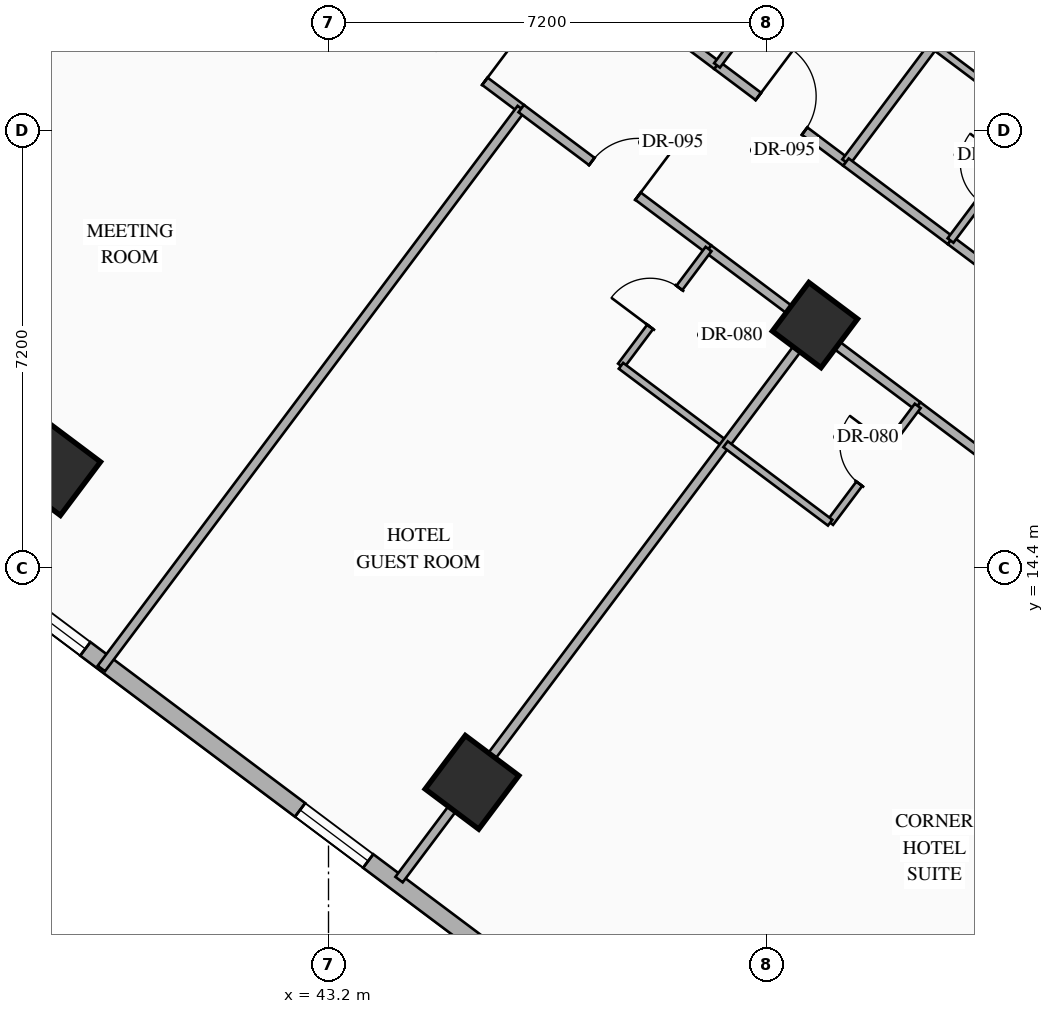
"""IFC4 building model, lengths in metres.
Left out: names, types, materials, properties, quantities, classifications, styles, units other than length and angle.
Written with IfcOpenShell. Run it as: python <this file> out.ifc"""

import sys

from ifc_helpers import new_model, si_unit, direction, frame, frame_2d, origin, origin_2d, place, context, subcontext, project, spatial, rectangle, hollow_rectangle, extrude, element, fill, save


model = new_model("IFC4")
c1 = context("Model", 3, precision=1e-05, world=origin(), true_north=direction((0.0, 1.0)))
c2 = subcontext(c1, "Body", "Model", "MODEL_VIEW")
j1 = project(units=[si_unit("LENGTHUNIT", "METRE"), si_unit("PLANEANGLEUNIT", "RADIAN")], contexts=[c1])
p1 = place(None, origin())
s1 = spatial("IfcSite", under=j1, at=p1, CompositionType="ELEMENT")
p2 = place(p1, origin())
s2 = spatial("IfcBuilding", under=s1, at=p2, CompositionType="ELEMENT")
p3 = place(p2, frame((0.0, 0.0, 43.3)))
s3 = spatial("IfcBuildingStorey", under=s2, at=p3, CompositionType="ELEMENT", Elevation=43.3)
for number, where, z_axis, x_axis in (
    (1, (38.68, 16.04, 0.0), (0.0, 0.0, 1.0), (0.8, -0.6, 0.0)),
    (2, (45.56, 10.88, 0.0), (0.0, 0.0, 1.0), (0.8, -0.6, 0.0)),
):
    element("IfcColumn", number, at=place(p3, frame(where, z_axis=z_axis, x_axis=x_axis)), inside=s3, PredefinedType="COLUMN", context=c2, shape_type="SweptSolid", body=[
        extrude(hollow_rectangle(XDim=1.1, YDim=1.1, WallThickness=0.04, at=origin_2d()), origin(), (0.0, 0.0, 1.0), 3.35),
    ])
p4 = place(p3, frame((51.2, 18.4, 0.0), z_axis=(0.0, 0.0, 1.0), x_axis=(0.799999996291, -0.600000004945, 0.0)))
e3 = element("IfcColumn", 3, at=p4, inside=s3, PredefinedType="COLUMN", context=c2, shape_type="SweptSolid", body=[
    extrude(hollow_rectangle(XDim=1.0, YDim=1.0, WallThickness=0.038, at=origin_2d()), origin(), (0.0, 0.0, 1.0), 3.35),
])
p5 = place(p3, frame((44.86, 40.73, 0.0), z_axis=(0.0, 0.0, 1.0), x_axis=(0.800006902154, -0.599990797017, 0.0)))
e4 = element("IfcWall", 4, at=p5, inside=s3, PredefinedType="STANDARD", context=c2, shape_type="SweptSolid", body=[
    extrude(rectangle(XDim=29.712, YDim=0.28, at=frame_2d((14.856, 0.0))), origin(), (0.0, 0.0, 1.0), 3.13),
])
p6 = place(p5, frame((14.249, 0.0, 0.0)))
e5 = element("IfcOpeningElement", 5, at=p6, cuts=e4, PredefinedType="OPENING", context=c2, shape_type="SweptSolid", body=[
    extrude(rectangle(XDim=1.1, YDim=2.2, at=frame_2d((0.55, 1.1))), frame((0.0, 0.15, 0.0), z_axis=(0.0, -1.0, 0.0), x_axis=(1.0, 0.0, 0.0)), (0.0, 0.0, 1.0), 0.3),
])
p7 = place(p5, frame((1.612, 0.0, 0.85)))
e6 = element("IfcOpeningElement", 6, at=p7, cuts=e4, PredefinedType="OPENING", context=c2, shape_type="SweptSolid", body=[
    extrude(rectangle(XDim=1.4, YDim=1.8, at=frame_2d((0.7, 0.9))), frame((0.0, 0.15, 0.0), z_axis=(0.0, -1.0, 0.0), x_axis=(1.0, 0.0, 0.0)), (0.0, 0.0, 1.0), 0.3),
])
p8 = place(p5, frame((5.667, 0.0, 0.85)))
e7 = element("IfcOpeningElement", 7, at=p8, cuts=e4, PredefinedType="OPENING", context=c2, shape_type="SweptSolid", body=[
    extrude(rectangle(XDim=1.4, YDim=1.8, at=frame_2d((0.7, 0.9))), frame((0.0, 0.15, 0.0), z_axis=(0.0, -1.0, 0.0), x_axis=(1.0, 0.0, 0.0)), (0.0, 0.0, 1.0), 0.3),
])
p9 = place(p5, frame((9.912, 0.0, 0.85)))
e8 = element("IfcOpeningElement", 8, at=p9, cuts=e4, PredefinedType="OPENING", context=c2, shape_type="SweptSolid", body=[
    extrude(rectangle(XDim=1.4, YDim=1.8, at=frame_2d((0.7, 0.9))), frame((0.0, 0.15, 0.0), z_axis=(0.0, -1.0, 0.0), x_axis=(1.0, 0.0, 0.0)), (0.0, 0.0, 1.0), 0.3),
])
p10 = place(p5, frame((19.528, 0.0, 0.85)))
e9 = element("IfcOpeningElement", 9, at=p10, cuts=e4, PredefinedType="OPENING", context=c2, shape_type="SweptSolid", body=[
    extrude(rectangle(XDim=1.4, YDim=1.8, at=frame_2d((0.7, 0.9))), frame((0.0, 0.15, 0.0), z_axis=(0.0, -1.0, 0.0), x_axis=(1.0, 0.0, 0.0)), (0.0, 0.0, 1.0), 0.3),
])
p11 = place(p5, frame((23.451, 0.0, 0.85)))
e10 = element("IfcOpeningElement", 10, at=p11, cuts=e4, PredefinedType="OPENING", context=c2, shape_type="SweptSolid", body=[
    extrude(rectangle(XDim=1.4, YDim=1.8, at=frame_2d((0.7, 0.9))), frame((0.0, 0.15, 0.0), z_axis=(0.0, -1.0, 0.0), x_axis=(1.0, 0.0, 0.0)), (0.0, 0.0, 1.0), 0.3),
])
p12 = place(p5, frame((27.852, 0.0, 0.85)))
e11 = element("IfcOpeningElement", 11, at=p12, cuts=e4, PredefinedType="OPENING", context=c2, shape_type="SweptSolid", body=[
    extrude(rectangle(XDim=1.4, YDim=1.8, at=frame_2d((0.7, 0.9))), frame((0.0, 0.15, 0.0), z_axis=(0.0, -1.0, 0.0), x_axis=(1.0, 0.0, 0.0)), (0.0, 0.0, 1.0), 0.3),
])
p13 = place(p3, frame((53.318, 2.487, 0.0), z_axis=(0.0, 0.0, 1.0), x_axis=(-0.800004174678, 0.599994433723, 0.0)))
e12 = element("IfcWall", 12, at=p13, inside=s3, PredefinedType="STANDARD", context=c2, shape_type="SweptSolid", body=[
    extrude(rectangle(XDim=35.089, YDim=0.28, at=frame_2d((17.544, 0.0))), origin(), (0.0, 0.0, 1.0), 3.13),
])
p14 = place(p13, frame((1.931, 0.0, 0.85)))
e13 = element("IfcOpeningElement", 13, at=p14, cuts=e12, PredefinedType="OPENING", context=c2, shape_type="SweptSolid", body=[
    extrude(rectangle(XDim=1.4, YDim=1.8, at=frame_2d((0.7, 0.9))), frame((0.0, 0.15, 0.0), z_axis=(0.0, -1.0, 0.0), x_axis=(1.0, 0.0, 0.0)), (0.0, 0.0, 1.0), 0.3),
])
p15 = place(p13, frame((6.819, 0.0, 0.85)))
e14 = element("IfcOpeningElement", 14, at=p15, cuts=e12, PredefinedType="OPENING", context=c2, shape_type="SweptSolid", body=[
    extrude(rectangle(XDim=1.4, YDim=1.8, at=frame_2d((0.7, 0.9))), frame((0.0, 0.15, 0.0), z_axis=(0.0, -1.0, 0.0), x_axis=(1.0, 0.0, 0.0)), (0.0, 0.0, 1.0), 0.3),
])
p16 = place(p13, frame((11.832, 0.0, 0.85)))
e15 = element("IfcOpeningElement", 15, at=p16, cuts=e12, PredefinedType="OPENING", context=c2, shape_type="SweptSolid", body=[
    extrude(rectangle(XDim=1.4, YDim=1.8, at=frame_2d((0.7, 0.9))), frame((0.0, 0.15, 0.0), z_axis=(0.0, -1.0, 0.0), x_axis=(1.0, 0.0, 0.0)), (0.0, 0.0, 1.0), 0.3),
])
p17 = place(p13, frame((17.647, 0.0, 0.85)))
e16 = element("IfcOpeningElement", 16, at=p17, cuts=e12, PredefinedType="OPENING", context=c2, shape_type="SweptSolid", body=[
    extrude(rectangle(XDim=1.4, YDim=1.8, at=frame_2d((0.7, 0.9))), frame((0.0, 0.15, 0.0), z_axis=(0.0, -1.0, 0.0), x_axis=(1.0, 0.0, 0.0)), (0.0, 0.0, 1.0), 0.3),
])
p18 = place(p13, frame((21.857, 0.0, 0.85)))
e17 = element("IfcOpeningElement", 17, at=p18, cuts=e12, PredefinedType="OPENING", context=c2, shape_type="SweptSolid", body=[
    extrude(rectangle(XDim=1.4, YDim=1.8, at=frame_2d((0.7, 0.9))), frame((0.0, 0.15, 0.0), z_axis=(0.0, -1.0, 0.0), x_axis=(1.0, 0.0, 0.0)), (0.0, 0.0, 1.0), 0.3),
])
p19 = place(p13, frame((26.87, 0.0, 0.85)))
e18 = element("IfcOpeningElement", 18, at=p19, cuts=e12, PredefinedType="OPENING", context=c2, shape_type="SweptSolid", body=[
    extrude(rectangle(XDim=1.4, YDim=1.8, at=frame_2d((0.7, 0.9))), frame((0.0, 0.15, 0.0), z_axis=(0.0, -1.0, 0.0), x_axis=(1.0, 0.0, 0.0)), (0.0, 0.0, 1.0), 0.3),
])
p20 = place(p13, frame((31.757, 0.0, 0.85)))
e19 = element("IfcOpeningElement", 19, at=p20, cuts=e12, PredefinedType="OPENING", context=c2, shape_type="SweptSolid", body=[
    extrude(rectangle(XDim=1.4, YDim=1.8, at=frame_2d((0.7, 0.9))), frame((0.0, 0.15, 0.0), z_axis=(0.0, -1.0, 0.0), x_axis=(1.0, 0.0, 0.0)), (0.0, 0.0, 1.0), 0.3),
])
p21 = place(p3, frame((43.037, 24.46, 0.0), z_axis=(0.0, 0.0, 1.0), x_axis=(0.799971872363, -0.600037501685, 0.0)))
e20 = element("IfcWall", 20, at=p21, inside=s3, PredefinedType="PARTITIONING", context=c2, shape_type="SweptSolid", body=[
    extrude(rectangle(XDim=4.167, YDim=0.15, at=frame_2d((2.083, 0.0))), origin(), (0.0, 0.0, 1.0), 2.425),
])
p22 = place(p21, frame((2.468, 0.0, 0.0)))
e21 = element("IfcOpeningElement", 21, at=p22, cuts=e20, PredefinedType="OPENING", context=c2, shape_type="SweptSolid", body=[
    extrude(rectangle(XDim=0.95, YDim=2.15, at=frame_2d((0.475, 1.075))), frame((0.0, 0.085, 0.0), z_axis=(0.0, -1.0, 0.0), x_axis=(1.0, 0.0, 0.0)), (0.0, 0.0, 1.0), 0.17),
])
p23 = place(p3, frame((33.384, 17.312, 0.0), z_axis=(0.0, 0.0, 1.0), x_axis=(0.600008743659, 0.799993442181, 0.0)))
e22 = element("IfcWall", 22, at=p23, inside=s3, PredefinedType="PARTITIONING", context=c2, shape_type="SweptSolid", body=[
    extrude(rectangle(XDim=8.935, YDim=0.15, at=frame_2d((4.468, 0.0))), origin(), (0.0, 0.0, 1.0), 3.13),
])
p24 = place(p3, frame((39.464, 12.752, 0.0), z_axis=(0.0, 0.0, 1.0), x_axis=(0.6, 0.8, 0.0)))
e23 = element("IfcWall", 23, at=p24, inside=s3, PredefinedType="PARTITIONING", context=c2, shape_type="SweptSolid", body=[
    extrude(rectangle(XDim=11.51, YDim=0.15, at=frame_2d((5.755, 0.0))), origin(), (0.0, 0.0, 1.0), 3.13),
])
p25 = place(p3, frame((47.87, 23.96, 0.0), z_axis=(0.0, 0.0, 1.0), x_axis=(0.79998637334, -0.60001816845, 0.0)))
e24 = element("IfcWall", 24, at=p25, inside=s3, PredefinedType="PARTITIONING", context=c2, shape_type="SweptSolid", body=[
    extrude(rectangle(XDim=2.15, YDim=0.15, at=frame_2d((1.075, 0.0))), origin(), (0.0, 0.0, 1.0), 2.775),
])
p26 = place(p3, frame((49.59, 22.67, 0.0), z_axis=(0.0, 0.0, 1.0), x_axis=(0.800011056104, -0.599985258246, 0.0)))
e25 = element("IfcWall", 25, at=p26, inside=s3, PredefinedType="PARTITIONING", context=c2, shape_type="SweptSolid", body=[
    extrude(rectangle(XDim=2.65, YDim=0.15, at=frame_2d((1.325, 0.0))), origin(), (0.0, 0.0, 1.0), 2.775),
])
p27 = place(p26, frame((0.85, 0.0, 0.0)))
e26 = element("IfcOpeningElement", 26, at=p27, cuts=e25, PredefinedType="OPENING", context=c2, shape_type="SweptSolid", body=[
    extrude(rectangle(XDim=0.95, YDim=2.15, at=frame_2d((0.475, 1.075))), frame((0.0, 0.085, 0.0), z_axis=(0.0, -1.0, 0.0), x_axis=(1.0, 0.0, 0.0)), (0.0, 0.0, 1.0), 0.17),
])
p28 = place(p3, frame((49.59, 22.67, 0.0), z_axis=(0.0, 0.0, 1.0), x_axis=(0.599951172744, 0.800036618114, 0.0)))
e27 = element("IfcWall", 27, at=p28, inside=s3, PredefinedType="PARTITIONING", context=c2, shape_type="SweptSolid", body=[
    extrude(rectangle(XDim=2.4, YDim=0.12, at=frame_2d((1.2, 0.0))), origin(), (0.0, 0.0, 1.0), 3.13),
])
p29 = place(p28, frame((0.8, 0.0, 0.0)))
e28 = element("IfcOpeningElement", 28, at=p29, cuts=e27, PredefinedType="OPENING", context=c2, shape_type="SweptSolid", body=[
    extrude(rectangle(XDim=0.8, YDim=2.06, at=frame_2d((0.4, 1.03))), frame((0.0, 0.07, 0.0), z_axis=(0.0, -1.0, 0.0), x_axis=(1.0, 0.0, 0.0)), (0.0, 0.0, 1.0), 0.14),
])
p30 = place(p3, frame((51.71, 21.08, 0.0), z_axis=(0.0, 0.0, 1.0), x_axis=(0.599996617946, 0.80000253653, 0.0)))
e29 = element("IfcWall", 29, at=p30, inside=s3, PredefinedType="PARTITIONING", context=c2, shape_type="SweptSolid", body=[
    extrude(rectangle(XDim=11.55, YDim=0.15, at=frame_2d((5.775, 0.0))), origin(), (0.0, 0.0, 1.0), 3.13),
])
p31 = place(p3, frame((51.71, 21.08, 0.0), z_axis=(0.0, 0.0, 1.0), x_axis=(0.79998637334, -0.60001816845, 0.0)))
e30 = element("IfcWall", 30, at=p31, inside=s3, PredefinedType="PARTITIONING", context=c2, shape_type="SweptSolid", body=[
    extrude(rectangle(XDim=2.15, YDim=0.15, at=frame_2d((1.075, 0.0))), origin(), (0.0, 0.0, 1.0), 2.775),
])
p32 = place(p3, frame((53.43, 19.79, 0.0), z_axis=(0.0, 0.0, 1.0), x_axis=(0.8, -0.6, 0.0)))
e31 = element("IfcWall", 31, at=p32, inside=s3, PredefinedType="PARTITIONING", context=c2, shape_type="SweptSolid", body=[
    extrude(rectangle(XDim=2.65, YDim=0.15, at=frame_2d((1.325, 0.0))), origin(), (0.0, 0.0, 1.0), 2.775),
])
p33 = place(p32, frame((0.85, 0.0, 0.0)))
e32 = element("IfcOpeningElement", 32, at=p33, cuts=e31, PredefinedType="OPENING", context=c2, shape_type="SweptSolid", body=[
    extrude(rectangle(XDim=0.95, YDim=2.15, at=frame_2d((0.475, 1.075))), frame((0.0, 0.085, 0.0), z_axis=(0.0, -1.0, 0.0), x_axis=(1.0, 0.0, 0.0)), (0.0, 0.0, 1.0), 0.17),
])
p34 = place(p3, frame((53.43, 19.79, 0.0), z_axis=(0.0, 0.0, 1.0), x_axis=(0.600065100855, 0.79995117022, 0.0)))
e33 = element("IfcWall", 33, at=p34, inside=s3, PredefinedType="PARTITIONING", context=c2, shape_type="SweptSolid", body=[
    extrude(rectangle(XDim=2.4, YDim=0.12, at=frame_2d((1.2, 0.0))), origin(), (0.0, 0.0, 1.0), 3.13),
])
p35 = place(p34, frame((0.8, 0.0, 0.0)))
e34 = element("IfcOpeningElement", 34, at=p35, cuts=e33, PredefinedType="OPENING", context=c2, shape_type="SweptSolid", body=[
    extrude(rectangle(XDim=0.8, YDim=2.06, at=frame_2d((0.4, 1.03))), frame((0.0, 0.07, 0.0), z_axis=(0.0, -1.0, 0.0), x_axis=(1.0, 0.0, 0.0)), (0.0, 0.0, 1.0), 0.14),
])
p36 = place(p3, frame((53.15, 23.0, 0.0), z_axis=(0.0, 0.0, 1.0), x_axis=(0.800027249606, -0.599963665473, 0.0)))
e35 = element("IfcWall", 35, at=p36, inside=s3, PredefinedType="PARTITIONING", context=c2, shape_type="SweptSolid", body=[
    extrude(rectangle(XDim=2.15, YDim=0.12, at=frame_2d((1.075, 0.0))), origin(), (0.0, 0.0, 1.0), 3.13),
])
p37 = place(p3, frame((46.37, 21.96, 0.0), z_axis=(0.0, 0.0, 1.0), x_axis=(0.799977170108, -0.600030438649, 0.0)))
e36 = element("IfcWall", 36, at=p37, inside=s3, PredefinedType="PARTITIONING", context=c2, shape_type="SweptSolid", body=[
    extrude(rectangle(XDim=3.85, YDim=0.15, at=frame_2d((1.925, 0.0))), origin(), (0.0, 0.0, 1.0), 2.425),
])
p38 = place(p37, frame((1.45, 0.0, 0.0)))
e37 = element("IfcOpeningElement", 37, at=p38, cuts=e36, PredefinedType="OPENING", context=c2, shape_type="SweptSolid", body=[
    extrude(rectangle(XDim=0.95, YDim=2.15, at=frame_2d((0.475, 1.075))), frame((0.0, 0.085, 0.0), z_axis=(0.0, -1.0, 0.0), x_axis=(1.0, 0.0, 0.0)), (0.0, 0.0, 1.0), 0.17),
])
p39 = place(p3, frame((49.45, 19.65, 0.0), z_axis=(0.0, 0.0, 1.0), x_axis=(0.800040880289, -0.59994548908, 0.0)))
e38 = element("IfcWall", 38, at=p39, inside=s3, PredefinedType="PARTITIONING", context=c2, shape_type="SweptSolid", body=[
    extrude(rectangle(XDim=2.15, YDim=0.15, at=frame_2d((1.075, 0.0))), origin(), (0.0, 0.0, 1.0), 2.425),
])
p40 = place(p3, frame((48.01, 17.73, 0.0), z_axis=(0.0, 0.0, 1.0), x_axis=(0.6, 0.8, 0.0)))
e39 = element("IfcWall", 39, at=p40, inside=s3, PredefinedType="PARTITIONING", context=c2, shape_type="SweptSolid", body=[
    extrude(rectangle(XDim=2.4, YDim=0.12, at=frame_2d((1.2, 0.0))), origin(), (0.0, 0.0, 1.0), 3.13),
])
p41 = place(p40, frame((0.8, 0.0, 0.0)))
e40 = element("IfcOpeningElement", 40, at=p41, cuts=e39, PredefinedType="OPENING", context=c2, shape_type="SweptSolid", body=[
    extrude(rectangle(XDim=0.8, YDim=2.06, at=frame_2d((0.4, 1.03))), frame((0.0, 0.07, 0.0), z_axis=(0.0, -1.0, 0.0), x_axis=(1.0, 0.0, 0.0)), (0.0, 0.0, 1.0), 0.14),
])
p42 = place(p3, frame((48.01, 17.73, 0.0), z_axis=(0.0, 0.0, 1.0), x_axis=(0.79998637334, -0.60001816845, 0.0)))
e41 = element("IfcWall", 41, at=p42, inside=s3, PredefinedType="PARTITIONING", context=c2, shape_type="SweptSolid", body=[
    extrude(rectangle(XDim=2.15, YDim=0.12, at=frame_2d((1.075, 0.0))), origin(), (0.0, 0.0, 1.0), 3.13),
])
p43 = place(p3, frame((44.36, 9.28, 0.0), z_axis=(0.0, 0.0, 1.0), x_axis=(0.599986233332, 0.800010324816, 0.0)))
e42 = element("IfcWall", 42, at=p43, inside=s3, PredefinedType="PARTITIONING", context=c2, shape_type="SweptSolid", body=[
    extrude(rectangle(XDim=11.35, YDim=0.15, at=frame_2d((5.675, 0.0))), origin(), (0.0, 0.0, 1.0), 2.425),
])
p44 = place(p3, frame((51.17, 18.36, 0.0), z_axis=(0.0, 0.0, 1.0), x_axis=(0.79998637334, -0.60001816845, 0.0)))
e43 = element("IfcWall", 43, at=p44, inside=s3, PredefinedType="PARTITIONING", context=c2, shape_type="SweptSolid", body=[
    extrude(rectangle(XDim=2.15, YDim=0.15, at=frame_2d((1.075, 0.0))), origin(), (0.0, 0.0, 1.0), 2.425),
])
p45 = place(p3, frame((52.89, 17.07, 0.0), z_axis=(0.0, 0.0, 1.0), x_axis=(0.8, -0.6, 0.0)))
e44 = element("IfcWall", 44, at=p45, inside=s3, PredefinedType="PARTITIONING", context=c2, shape_type="SweptSolid", body=[
    extrude(rectangle(XDim=11.51, YDim=0.15, at=frame_2d((5.755, 0.0))), origin(), (0.0, 0.0, 1.0), 2.425),
])
p46 = place(p45, frame((5.28, 0.0, 0.0)))
e45 = element("IfcOpeningElement", 45, at=p46, cuts=e44, PredefinedType="OPENING", context=c2, shape_type="SweptSolid", body=[
    extrude(rectangle(XDim=0.95, YDim=2.15, at=frame_2d((0.475, 1.075))), frame((0.0, 0.085, 0.0), z_axis=(0.0, -1.0, 0.0), x_axis=(1.0, 0.0, 0.0)), (0.0, 0.0, 1.0), 0.17),
])
p47 = place(p3, frame((51.45, 15.15, 0.0), z_axis=(0.0, 0.0, 1.0), x_axis=(0.599951172744, 0.800036618114, 0.0)))
e46 = element("IfcWall", 46, at=p47, inside=s3, PredefinedType="PARTITIONING", context=c2, shape_type="SweptSolid", body=[
    extrude(rectangle(XDim=2.4, YDim=0.12, at=frame_2d((1.2, 0.0))), origin(), (0.0, 0.0, 1.0), 3.13),
])
p48 = place(p47, frame((0.8, 0.0, 0.0)))
e47 = element("IfcOpeningElement", 47, at=p48, cuts=e46, PredefinedType="OPENING", context=c2, shape_type="SweptSolid", body=[
    extrude(rectangle(XDim=0.8, YDim=2.06, at=frame_2d((0.4, 1.03))), frame((0.0, 0.07, 0.0), z_axis=(0.0, -1.0, 0.0), x_axis=(1.0, 0.0, 0.0)), (0.0, 0.0, 1.0), 0.14),
])
p49 = place(p3, frame((49.73, 16.44, 0.0), z_axis=(0.0, 0.0, 1.0), x_axis=(0.79998637334, -0.60001816845, 0.0)))
e48 = element("IfcWall", 48, at=p49, inside=s3, PredefinedType="PARTITIONING", context=c2, shape_type="SweptSolid", body=[
    extrude(rectangle(XDim=2.15, YDim=0.12, at=frame_2d((1.075, 0.0))), origin(), (0.0, 0.0, 1.0), 3.13),
])
p50 = place(p16, origin())
e49 = element("IfcWindow", 49, at=p50, inside=s3, PartitioningType="SINGLE_PANEL", PredefinedType="WINDOW", context=c2, shape_type="SweptSolid", body=[
    extrude(rectangle(XDim=1.4, YDim=1.8, at=frame_2d((0.7, 0.9))), frame((0.0, 0.03, 0.0), z_axis=(0.0, -1.0, 0.0), x_axis=(1.0, 0.0, 0.0)), (0.0, 0.0, 1.0), 0.06),
])
fill(e15, e49)
p51 = place(p17, origin())
e50 = element("IfcWindow", 50, at=p51, inside=s3, PartitioningType="SINGLE_PANEL", PredefinedType="WINDOW", context=c2, shape_type="SweptSolid", body=[
    extrude(rectangle(XDim=1.4, YDim=1.8, at=frame_2d((0.7, 0.9))), frame((0.0, 0.03, 0.0), z_axis=(0.0, -1.0, 0.0), x_axis=(1.0, 0.0, 0.0)), (0.0, 0.0, 1.0), 0.06),
])
fill(e16, e50)
p52 = place(p22, origin())
e51 = element("IfcDoor", 51, at=p52, inside=s3, OperationType="SINGLE_SWING_RIGHT", PredefinedType="DOOR", context=c2, shape_type="SweptSolid", body=[
    extrude(rectangle(XDim=0.95, YDim=2.15, at=frame_2d((0.475, 1.075))), frame((0.0, 0.025, 0.0), z_axis=(0.0, -1.0, 0.0), x_axis=(1.0, 0.0, 0.0)), (0.0, 0.0, 1.0), 0.05),
])
fill(e21, e51)
p53 = place(p27, origin())
e52 = element("IfcDoor", 52, at=p53, inside=s3, OperationType="SINGLE_SWING_LEFT", PredefinedType="DOOR", context=c2, shape_type="SweptSolid", body=[
    extrude(rectangle(XDim=0.95, YDim=2.15, at=frame_2d((0.475, 1.075))), frame((0.0, 0.025, 0.0), z_axis=(0.0, -1.0, 0.0), x_axis=(1.0, 0.0, 0.0)), (0.0, 0.0, 1.0), 0.05),
])
fill(e26, e52)
p54 = place(p38, origin())
e53 = element("IfcDoor", 53, at=p54, inside=s3, OperationType="SINGLE_SWING_RIGHT", PredefinedType="DOOR", context=c2, shape_type="SweptSolid", body=[
    extrude(rectangle(XDim=0.95, YDim=2.15, at=frame_2d((0.475, 1.075))), frame((0.0, 0.025, 0.0), z_axis=(0.0, -1.0, 0.0), x_axis=(1.0, 0.0, 0.0)), (0.0, 0.0, 1.0), 0.05),
])
fill(e37, e53)
p55 = place(p41, origin())
e54 = element("IfcDoor", 54, at=p55, inside=s3, OperationType="SINGLE_SWING_LEFT", PredefinedType="DOOR", context=c2, shape_type="SweptSolid", body=[
    extrude(rectangle(XDim=0.8, YDim=2.06, at=frame_2d((0.4, 1.03))), frame((0.0, 0.025, 0.0), z_axis=(0.0, -1.0, 0.0), x_axis=(1.0, 0.0, 0.0)), (0.0, 0.0, 1.0), 0.05),
])
fill(e40, e54)
p56 = place(p48, origin())
e55 = element("IfcDoor", 55, at=p56, inside=s3, OperationType="SINGLE_SWING_RIGHT", PredefinedType="DOOR", context=c2, shape_type="SweptSolid", body=[
    extrude(rectangle(XDim=0.8, YDim=2.06, at=frame_2d((0.4, 1.03))), frame((0.0, 0.025, 0.0), z_axis=(0.0, -1.0, 0.0), x_axis=(1.0, 0.0, 0.0)), (0.0, 0.0, 1.0), 0.05),
])
fill(e47, e55)
save(model, sys.argv[1])
